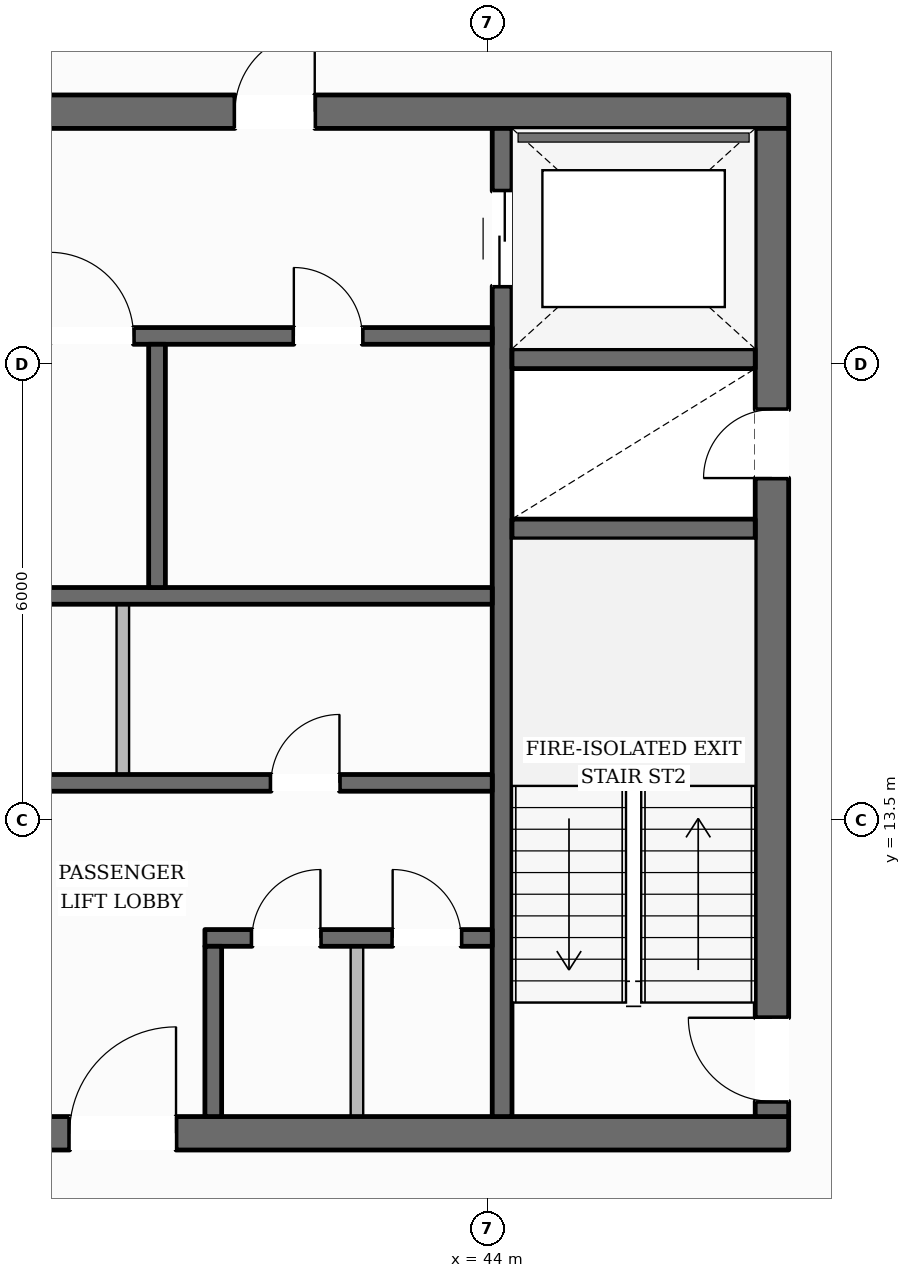
"""IFC4 building model, lengths in metres.
Left out: names, types, materials, properties, quantities, classifications, styles, units other than length and angle.
Written with IfcOpenShell. Run it as: python <this file> out.ifc"""

import sys

from ifc_helpers import new_model, si_unit, direction, frame, frame_2d, origin, place, context, subcontext, project, spatial, rectangle, extrude, element, fill, save


model = new_model("IFC4")
c1 = context("Model", 3, precision=1e-05, world=origin(), true_north=direction((0.0, 1.0)))
c2 = subcontext(c1, "Body", "Model", "MODEL_VIEW")
j1 = project(units=[si_unit("LENGTHUNIT", "METRE"), si_unit("PLANEANGLEUNIT", "RADIAN")], contexts=[c1])
p1 = place(None, origin())
s1 = spatial("IfcSite", under=j1, at=p1, CompositionType="ELEMENT")
p2 = place(p1, origin())
s2 = spatial("IfcBuilding", under=s1, at=p2, CompositionType="ELEMENT")
p3 = place(p2, frame((0.0, 0.0, 211.2)))
s3 = spatial("IfcBuildingStorey", under=s2, at=p3, CompositionType="ELEMENT", Elevation=211.2)
p4 = place(p3, frame((28.04, 9.38, 0.0), z_axis=(0.0, 0.0, 1.0), x_axis=(1.0, 0.0, 0.0)))
e1 = element("IfcWall", 1, at=p4, inside=s3, PredefinedType="SOLIDWALL", context=c2, shape_type="SweptSolid", body=[
    extrude(rectangle(XDim=19.92, YDim=0.44, at=frame_2d((9.96, 0.0))), origin(), (0.0, 0.0, 1.0), 3.6),
])
p5 = place(p4, frame((10.46, 0.0, 0.0)))
e2 = element("IfcOpeningElement", 2, at=p5, cuts=e1, PredefinedType="OPENING", context=c2, shape_type="SweptSolid", body=[
    extrude(rectangle(XDim=1.4, YDim=2.2, at=frame_2d((0.7, 1.1))), frame((0.0, 0.23, 0.0), z_axis=(0.0, -1.0, 0.0), x_axis=(1.0, 0.0, 0.0)), (0.0, 0.0, 1.0), 0.46),
])
p6 = place(p3, frame((28.04, 22.82, 0.0), z_axis=(0.0, 0.0, 1.0), x_axis=(1.0, 0.0, 0.0)))
e3 = element("IfcWall", 3, at=p6, inside=s3, PredefinedType="SOLIDWALL", context=c2, shape_type="SweptSolid", body=[
    extrude(rectangle(XDim=19.92, YDim=0.44, at=frame_2d((9.96, 0.0))), origin(), (0.0, 0.0, 1.0), 3.6),
])
p7 = place(p6, frame((6.235, 0.0, 0.0)))
e4 = element("IfcOpeningElement", 4, at=p7, cuts=e3, PredefinedType="OPENING", context=c2, shape_type="SweptSolid", body=[
    extrude(rectangle(XDim=1.05, YDim=2.15, at=frame_2d((0.525, 1.075))), frame((0.0, 0.23, 0.0), z_axis=(0.0, -1.0, 0.0), x_axis=(1.0, 0.0, 0.0)), (0.0, 0.0, 1.0), 0.46),
])
p8 = place(p6, frame((12.635, 0.0, 0.0)))
e5 = element("IfcOpeningElement", 5, at=p8, cuts=e3, PredefinedType="OPENING", context=c2, shape_type="SweptSolid", body=[
    extrude(rectangle(XDim=1.05, YDim=2.15, at=frame_2d((0.525, 1.075))), frame((0.0, 0.23, 0.0), z_axis=(0.0, -1.0, 0.0), x_axis=(1.0, 0.0, 0.0)), (0.0, 0.0, 1.0), 0.46),
])
p9 = place(p3, frame((47.74, 9.6, 0.0), z_axis=(0.0, 0.0, 1.0), x_axis=(0.0, 1.0, 0.0)))
e6 = element("IfcWall", 6, at=p9, inside=s3, PredefinedType="SOLIDWALL", context=c2, shape_type="SweptSolid", body=[
    extrude(rectangle(XDim=13.0, YDim=0.44, at=frame_2d((6.5, 0.0))), origin(), (0.0, 0.0, 1.0), 3.6),
])
p10 = place(p9, frame((0.2, 0.0, 0.0)))
e7 = element("IfcOpeningElement", 7, at=p10, cuts=e6, PredefinedType="OPENING", context=c2, shape_type="SweptSolid", body=[
    extrude(rectangle(XDim=1.1, YDim=2.15, at=frame_2d((0.55, 1.075))), frame((0.0, 0.23, 0.0), z_axis=(0.0, -1.0, 0.0), x_axis=(1.0, 0.0, 0.0)), (0.0, 0.0, 1.0), 0.46),
])
p11 = place(p9, frame((8.4, 0.0, 0.0)))
e8 = element("IfcOpeningElement", 8, at=p11, cuts=e6, PredefinedType="OPENING", context=c2, shape_type="SweptSolid", body=[
    extrude(rectangle(XDim=0.9, YDim=2.1, at=frame_2d((0.45, 1.05))), frame((0.0, 0.23, 0.0), z_axis=(0.0, -1.0, 0.0), x_axis=(1.0, 0.0, 0.0)), (0.0, 0.0, 1.0), 0.46),
])
p12 = place(p3, frame((44.19, 9.6, 0.0), z_axis=(0.0, 0.0, 1.0), x_axis=(0.0, 1.0, 0.0)))
e9 = element("IfcWall", 9, at=p12, inside=s3, PredefinedType="SHEAR", context=c2, shape_type="SweptSolid", body=[
    extrude(rectangle(XDim=13.0, YDim=0.26, at=frame_2d((6.5, 0.0))), origin(), (0.0, 0.0, 1.0), 3.6),
])
p13 = place(p12, frame((10.925, 0.0, 0.0)))
e10 = element("IfcOpeningElement", 10, at=p13, cuts=e9, PredefinedType="OPENING", context=c2, shape_type="SweptSolid", body=[
    extrude(rectangle(XDim=1.25, YDim=2.25, at=frame_2d((0.625, 1.125))), frame((0.0, 0.14, 0.0), z_axis=(0.0, -1.0, 0.0), x_axis=(1.0, 0.0, 0.0)), (0.0, 0.0, 1.0), 0.28),
])
for number, where, z_axis, x_axis in (
    (11, (44.32, 17.33, 0.0), (0.0, 0.0, 1.0), (1.0, 0.0, 0.0)),
    (12, (44.32, 19.57, 0.0), (0.0, 0.0, 1.0), (1.0, 0.0, 0.0)),
):
    element("IfcWall", number, at=place(p3, frame(where, z_axis=z_axis, x_axis=x_axis)), inside=s3, PredefinedType="SHEAR", context=c2, shape_type="SweptSolid", body=[
        extrude(rectangle(XDim=3.2, YDim=0.26, at=frame_2d((1.6, 0.0))), origin(), (0.0, 0.0, 1.0), 3.6),
    ])
p14 = place(p3, frame((31.94, 19.87, 0.0), z_axis=(0.0, 0.0, 1.0), x_axis=(1.0, 0.0, 0.0)))
e13 = element("IfcWall", 13, at=p14, inside=s3, PredefinedType="SOLIDWALL", context=c2, shape_type="SweptSolid", body=[
    extrude(rectangle(XDim=12.12, YDim=0.22, at=frame_2d((6.06, 0.0))), origin(), (0.0, 0.0, 1.0), 3.6),
])
p15 = place(p14, frame((6.3, 0.0, 0.0)))
e14 = element("IfcOpeningElement", 14, at=p15, cuts=e13, PredefinedType="OPENING", context=c2, shape_type="SweptSolid", body=[
    extrude(rectangle(XDim=1.1, YDim=2.15, at=frame_2d((0.55, 1.075))), frame((0.0, 0.12, 0.0), z_axis=(0.0, -1.0, 0.0), x_axis=(1.0, 0.0, 0.0)), (0.0, 0.0, 1.0), 0.24),
])
p16 = place(p14, frame((9.51, 0.0, 0.0)))
e15 = element("IfcOpeningElement", 15, at=p16, cuts=e13, PredefinedType="OPENING", context=c2, shape_type="SweptSolid", body=[
    extrude(rectangle(XDim=0.9, YDim=2.1, at=frame_2d((0.45, 1.05))), frame((0.0, 0.12, 0.0), z_axis=(0.0, -1.0, 0.0), x_axis=(1.0, 0.0, 0.0)), (0.0, 0.0, 1.0), 0.24),
])
p17 = place(p3, frame((31.94, 16.45, 0.0), z_axis=(0.0, 0.0, 1.0), x_axis=(1.0, 0.0, 0.0)))
e16 = element("IfcWall", 16, at=p17, inside=s3, PredefinedType="SOLIDWALL", context=c2, shape_type="SweptSolid", body=[
    extrude(rectangle(XDim=12.12, YDim=0.22, at=frame_2d((6.06, 0.0))), origin(), (0.0, 0.0, 1.0), 3.6),
])
p18 = place(p3, frame((39.65, 16.56, 0.0), z_axis=(0.0, 0.0, 1.0), x_axis=(0.0, 1.0, 0.0)))
e17 = element("IfcWall", 17, at=p18, inside=s3, PredefinedType="SOLIDWALL", context=c2, shape_type="SweptSolid", body=[
    extrude(rectangle(XDim=3.2, YDim=0.22, at=frame_2d((1.6, 0.0))), origin(), (0.0, 0.0, 1.0), 3.6),
])
p19 = place(p3, frame((31.94, 13.99, 0.0), z_axis=(0.0, 0.0, 1.0), x_axis=(1.0, 0.0, 0.0)))
e18 = element("IfcWall", 18, at=p19, inside=s3, PredefinedType="SOLIDWALL", context=c2, shape_type="SweptSolid", body=[
    extrude(rectangle(XDim=12.12, YDim=0.22, at=frame_2d((6.06, 0.0))), origin(), (0.0, 0.0, 1.0), 3.6),
])
p20 = place(p19, frame((3.11, 0.0, 0.0)))
e19 = element("IfcOpeningElement", 19, at=p20, cuts=e18, PredefinedType="OPENING", context=c2, shape_type="SweptSolid", body=[
    extrude(rectangle(XDim=0.9, YDim=2.1, at=frame_2d((0.45, 1.05))), frame((0.0, 0.12, 0.0), z_axis=(0.0, -1.0, 0.0), x_axis=(1.0, 0.0, 0.0)), (0.0, 0.0, 1.0), 0.24),
])
p21 = place(p19, frame((9.21, 0.0, 0.0)))
e20 = element("IfcOpeningElement", 20, at=p21, cuts=e18, PredefinedType="OPENING", context=c2, shape_type="SweptSolid", body=[
    extrude(rectangle(XDim=0.9, YDim=2.1, at=frame_2d((0.45, 1.05))), frame((0.0, 0.12, 0.0), z_axis=(0.0, -1.0, 0.0), x_axis=(1.0, 0.0, 0.0)), (0.0, 0.0, 1.0), 0.24),
])
p22 = place(p3, frame((40.28, 11.95, 0.0), z_axis=(0.0, 0.0, 1.0), x_axis=(1.0, 0.0, 0.0)))
e21 = element("IfcWall", 21, at=p22, inside=s3, PredefinedType="SOLIDWALL", context=c2, shape_type="SweptSolid", body=[
    extrude(rectangle(XDim=3.78, YDim=0.22, at=frame_2d((1.89, 0.0))), origin(), (0.0, 0.0, 1.0), 3.6),
])
p23 = place(p22, frame((0.62, 0.0, 0.0)))
e22 = element("IfcOpeningElement", 22, at=p23, cuts=e21, PredefinedType="OPENING", context=c2, shape_type="SweptSolid", body=[
    extrude(rectangle(XDim=0.9, YDim=2.1, at=frame_2d((0.45, 1.05))), frame((0.0, 0.12, 0.0), z_axis=(0.0, -1.0, 0.0), x_axis=(1.0, 0.0, 0.0)), (0.0, 0.0, 1.0), 0.24),
])
p24 = place(p22, frame((2.47, 0.0, 0.0)))
e23 = element("IfcOpeningElement", 23, at=p24, cuts=e21, PredefinedType="OPENING", context=c2, shape_type="SweptSolid", body=[
    extrude(rectangle(XDim=0.9, YDim=2.1, at=frame_2d((0.45, 1.05))), frame((0.0, 0.12, 0.0), z_axis=(0.0, -1.0, 0.0), x_axis=(1.0, 0.0, 0.0)), (0.0, 0.0, 1.0), 0.24),
])
p25 = place(p3, frame((40.39, 9.6, 0.0), z_axis=(0.0, 0.0, 1.0), x_axis=(0.0, 1.0, 0.0)))
e24 = element("IfcWall", 24, at=p25, inside=s3, PredefinedType="SOLIDWALL", context=c2, shape_type="SweptSolid", body=[
    extrude(rectangle(XDim=2.24, YDim=0.22, at=frame_2d((1.12, 0.0))), origin(), (0.0, 0.0, 1.0), 3.6),
])
p26 = place(p3, frame((42.066, 44.299, 0.0), z_axis=(0.0, 0.0, 1.0), x_axis=(0.502188775534, -0.864758020331, 0.0)))
e25 = element("IfcWall", 25, at=p26, inside=s3, PredefinedType="STANDARD", context=c2, shape_type="SweptSolid", body=[
    extrude(rectangle(XDim=38.263, YDim=0.35, at=frame_2d((19.132, 0.0))), origin(), (0.0, 0.0, 1.0), 3.132),
])
p27 = place(p26, frame((33.948, 0.0, 0.65)))
e26 = element("IfcOpeningElement", 26, at=p27, cuts=e25, PredefinedType="OPENING", context=c2, shape_type="SweptSolid", body=[
    extrude(rectangle(XDim=1.45, YDim=1.75, at=frame_2d((0.725, 0.875))), frame((0.0, 0.185, 0.0), z_axis=(0.0, -1.0, 0.0), x_axis=(1.0, 0.0, 0.0)), (0.0, 0.0, 1.0), 0.37),
])
p28 = place(p26, frame((27.731, 0.0, 0.65)))
e27 = element("IfcOpeningElement", 27, at=p28, cuts=e25, PredefinedType="OPENING", context=c2, shape_type="SweptSolid", body=[
    extrude(rectangle(XDim=1.45, YDim=1.75, at=frame_2d((0.725, 0.875))), frame((0.0, 0.185, 0.0), z_axis=(0.0, -1.0, 0.0), x_axis=(1.0, 0.0, 0.0)), (0.0, 0.0, 1.0), 0.37),
])
p29 = place(p26, frame((15.297, 0.0, 0.65)))
e28 = element("IfcOpeningElement", 28, at=p29, cuts=e25, PredefinedType="OPENING", context=c2, shape_type="SweptSolid", body=[
    extrude(rectangle(XDim=1.45, YDim=1.75, at=frame_2d((0.725, 0.875))), frame((0.0, 0.185, 0.0), z_axis=(0.0, -1.0, 0.0), x_axis=(1.0, 0.0, 0.0)), (0.0, 0.0, 1.0), 0.37),
])
p30 = place(p26, frame((9.079, 0.0, 0.65)))
e29 = element("IfcOpeningElement", 29, at=p30, cuts=e25, PredefinedType="OPENING", context=c2, shape_type="SweptSolid", body=[
    extrude(rectangle(XDim=1.45, YDim=1.75, at=frame_2d((0.725, 0.875))), frame((0.0, 0.185, 0.0), z_axis=(0.0, -1.0, 0.0), x_axis=(1.0, 0.0, 0.0)), (0.0, 0.0, 1.0), 0.37),
])
p31 = place(p26, frame((2.862, 0.0, 0.65)))
e30 = element("IfcOpeningElement", 30, at=p31, cuts=e25, PredefinedType="OPENING", context=c2, shape_type="SweptSolid", body=[
    extrude(rectangle(XDim=1.45, YDim=1.75, at=frame_2d((0.725, 0.875))), frame((0.0, 0.185, 0.0), z_axis=(0.0, -1.0, 0.0), x_axis=(1.0, 0.0, 0.0)), (0.0, 0.0, 1.0), 0.37),
])
p32 = place(p3, frame((39.2, 14.1, 0.0), z_axis=(0.0, 0.0, 1.0), x_axis=(0.0, 1.0, 0.0)))
e31 = element("IfcWall", 31, at=p32, inside=s3, PredefinedType="PARTITIONING", context=c2, shape_type="SweptSolid", body=[
    extrude(rectangle(XDim=2.24, YDim=0.165, at=frame_2d((1.12, 0.0))), origin(), (0.0, 0.0, 1.0), 3.6),
])
p33 = place(p3, frame((42.28, 9.52, 0.0), z_axis=(0.0, 0.0, 1.0), x_axis=(0.0, 1.0, 0.0)))
e32 = element("IfcWall", 32, at=p33, inside=s3, PredefinedType="PARTITIONING", context=c2, shape_type="SweptSolid", body=[
    extrude(rectangle(XDim=2.32, YDim=0.165, at=frame_2d((1.16, 0.0))), origin(), (0.0, 0.0, 1.0), 3.6),
])
p34 = place(p10, origin())
e33 = element("IfcDoor", 33, at=p34, inside=s3, OperationType="SINGLE_SWING_RIGHT", PredefinedType="DOOR", context=c2, shape_type="SweptSolid", body=[
    extrude(rectangle(XDim=1.1, YDim=2.15, at=frame_2d((0.55, 1.075))), frame((0.0, 0.025, 0.0), z_axis=(0.0, -1.0, 0.0), x_axis=(1.0, 0.0, 0.0)), (0.0, 0.0, 1.0), 0.05),
])
fill(e7, e33)
p35 = place(p15, origin())
e34 = element("IfcDoor", 34, at=p35, inside=s3, OperationType="SINGLE_SWING_LEFT", PredefinedType="DOOR", context=c2, shape_type="SweptSolid", body=[
    extrude(rectangle(XDim=1.1, YDim=2.15, at=frame_2d((0.55, 1.075))), frame((0.0, 0.025, 0.0), z_axis=(0.0, -1.0, 0.0), x_axis=(1.0, 0.0, 0.0)), (0.0, 0.0, 1.0), 0.05),
])
fill(e14, e34)
p36 = place(p11, origin())
e35 = element("IfcDoor", 35, at=p36, inside=s3, OperationType="SINGLE_SWING_LEFT", PredefinedType="DOOR", context=c2, shape_type="SweptSolid", body=[
    extrude(rectangle(XDim=0.9, YDim=2.1, at=frame_2d((0.45, 1.05))), frame((0.0, 0.025, 0.0), z_axis=(0.0, -1.0, 0.0), x_axis=(1.0, 0.0, 0.0)), (0.0, 0.0, 1.0), 0.05),
])
fill(e8, e35)
p37 = place(p8, origin())
e36 = element("IfcDoor", 36, at=p37, inside=s3, OperationType="SINGLE_SWING_RIGHT", PredefinedType="DOOR", context=c2, shape_type="SweptSolid", body=[
    extrude(rectangle(XDim=1.05, YDim=2.15, at=frame_2d((0.525, 1.075))), frame((0.0, 0.025, 0.0), z_axis=(0.0, -1.0, 0.0), x_axis=(1.0, 0.0, 0.0)), (0.0, 0.0, 1.0), 0.05),
])
fill(e5, e36)
p38 = place(p13, origin())
e37 = element("IfcDoor", 37, at=p38, inside=s3, OperationType="DOUBLE_DOOR_SLIDING", PredefinedType="DOOR", context=c2, shape_type="SweptSolid", body=[
    extrude(rectangle(XDim=1.25, YDim=2.25, at=frame_2d((0.625, 1.125))), frame((0.0, 0.025, 0.0), z_axis=(0.0, -1.0, 0.0), x_axis=(1.0, 0.0, 0.0)), (0.0, 0.0, 1.0), 0.05),
])
fill(e10, e37)
p39 = place(p5, origin())
e38 = element("IfcDoor", 38, at=p39, inside=s3, OperationType="SINGLE_SWING_RIGHT", PredefinedType="DOOR", context=c2, shape_type="SweptSolid", body=[
    extrude(rectangle(XDim=1.4, YDim=2.2, at=frame_2d((0.7, 1.1))), frame((0.0, 0.025, 0.0), z_axis=(0.0, -1.0, 0.0), x_axis=(1.0, 0.0, 0.0)), (0.0, 0.0, 1.0), 0.05),
])
fill(e2, e38)
p40 = place(p21, origin())
e39 = element("IfcDoor", 39, at=p40, inside=s3, OperationType="SINGLE_SWING_RIGHT", PredefinedType="DOOR", context=c2, shape_type="SweptSolid", body=[
    extrude(rectangle(XDim=0.9, YDim=2.1, at=frame_2d((0.45, 1.05))), frame((0.0, 0.025, 0.0), z_axis=(0.0, -1.0, 0.0), x_axis=(1.0, 0.0, 0.0)), (0.0, 0.0, 1.0), 0.05),
])
fill(e20, e39)
p41 = place(p16, origin())
e40 = element("IfcDoor", 40, at=p41, inside=s3, OperationType="SINGLE_SWING_LEFT", PredefinedType="DOOR", context=c2, shape_type="SweptSolid", body=[
    extrude(rectangle(XDim=0.9, YDim=2.1, at=frame_2d((0.45, 1.05))), frame((0.0, 0.025, 0.0), z_axis=(0.0, -1.0, 0.0), x_axis=(1.0, 0.0, 0.0)), (0.0, 0.0, 1.0), 0.05),
])
fill(e15, e40)
p42 = place(p23, origin())
e41 = element("IfcDoor", 41, at=p42, inside=s3, OperationType="SINGLE_SWING_RIGHT", PredefinedType="DOOR", context=c2, shape_type="SweptSolid", body=[
    extrude(rectangle(XDim=0.9, YDim=2.1, at=frame_2d((0.45, 1.05))), frame((0.0, 0.025, 0.0), z_axis=(0.0, -1.0, 0.0), x_axis=(1.0, 0.0, 0.0)), (0.0, 0.0, 1.0), 0.05),
])
fill(e22, e41)
p43 = place(p24, origin())
e42 = element("IfcDoor", 42, at=p43, inside=s3, OperationType="SINGLE_SWING_LEFT", PredefinedType="DOOR", context=c2, shape_type="SweptSolid", body=[
    extrude(rectangle(XDim=0.9, YDim=2.1, at=frame_2d((0.45, 1.05))), frame((0.0, 0.025, 0.0), z_axis=(0.0, -1.0, 0.0), x_axis=(1.0, 0.0, 0.0)), (0.0, 0.0, 1.0), 0.05),
])
fill(e23, e42)
save(model, sys.argv[1])
